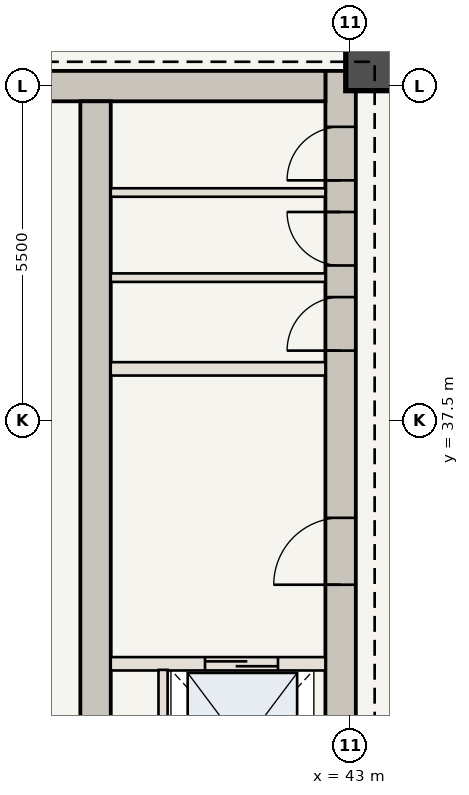
"""IFC4 building model, lengths in metres.
Left out: names, types, materials, properties, quantities, classifications, styles, units other than length and angle.
Written with IfcOpenShell. Run it as: python <this file> out.ifc"""

import sys

from ifc_helpers import new_model, si_unit, direction, frame, frame_2d, origin, origin_2d, place, context, subcontext, project, spatial, rectangle, extrude, element, fill, save


model = new_model("IFC4")
c1 = context("Model", 3, precision=1e-05, world=origin(), true_north=direction((0.0, 1.0)))
c2 = subcontext(c1, "Body", "Model", "MODEL_VIEW")
j1 = project(units=[si_unit("LENGTHUNIT", "METRE"), si_unit("PLANEANGLEUNIT", "RADIAN")], contexts=[c1])
p1 = place(None, origin())
s1 = spatial("IfcSite", under=j1, at=p1, CompositionType="ELEMENT")
p2 = place(p1, origin())
s2 = spatial("IfcBuilding", under=s1, at=p2, CompositionType="ELEMENT")
p3 = place(p2, frame((0.0, 0.0, 248.5)))
s3 = spatial("IfcBuildingStorey", under=s2, at=p3, CompositionType="ELEMENT", Elevation=248.5)
p4 = place(p3, frame((42.84, 30.6, 0.0), z_axis=(0.0, 0.0, 1.0), x_axis=(0.0, 1.0, 0.0)))
e1 = element("IfcWall", 1, at=p4, inside=s3, PredefinedType="SHEAR", context=c2, shape_type="SweptSolid", body=[
    extrude(rectangle(XDim=12.65, YDim=0.5, at=frame_2d((6.325, 0.0))), origin(), (0.0, 0.0, 1.0), 3.85),
])
p5 = place(p4, frame((4.2, 0.0, 0.0)))
e2 = element("IfcOpeningElement", 2, at=p5, cuts=e1, PredefinedType="OPENING", context=c2, shape_type="SweptSolid", body=[
    extrude(rectangle(XDim=1.1, YDim=2.15, at=frame_2d((0.55, 1.075))), frame((0.0, 0.26, 0.0), z_axis=(0.0, -1.0, 0.0), x_axis=(1.0, 0.0, 0.0)), (0.0, 0.0, 1.0), 0.52),
])
p6 = place(p4, frame((8.05, 0.0, 0.0)))
e3 = element("IfcOpeningElement", 3, at=p6, cuts=e1, PredefinedType="OPENING", context=c2, shape_type="SweptSolid", body=[
    extrude(rectangle(XDim=0.88, YDim=2.1, at=frame_2d((0.44, 1.05))), frame((0.0, 0.26, 0.0), z_axis=(0.0, -1.0, 0.0), x_axis=(1.0, 0.0, 0.0)), (0.0, 0.0, 1.0), 0.52),
])
p7 = place(p4, frame((9.45, 0.0, 0.0)))
e4 = element("IfcOpeningElement", 4, at=p7, cuts=e1, PredefinedType="OPENING", context=c2, shape_type="SweptSolid", body=[
    extrude(rectangle(XDim=0.88, YDim=2.1, at=frame_2d((0.44, 1.05))), frame((0.0, 0.26, 0.0), z_axis=(0.0, -1.0, 0.0), x_axis=(1.0, 0.0, 0.0)), (0.0, 0.0, 1.0), 0.52),
])
p8 = place(p4, frame((10.85, 0.0, 0.0)))
e5 = element("IfcOpeningElement", 5, at=p8, cuts=e1, PredefinedType="OPENING", context=c2, shape_type="SweptSolid", body=[
    extrude(rectangle(XDim=0.88, YDim=2.1, at=frame_2d((0.44, 1.05))), frame((0.0, 0.26, 0.0), z_axis=(0.0, -1.0, 0.0), x_axis=(1.0, 0.0, 0.0)), (0.0, 0.0, 1.0), 0.52),
])
p9 = place(p3, frame((37.75, 43.0, 0.0), z_axis=(0.0, 0.0, 1.0), x_axis=(1.0, 0.0, 0.0)))
e6 = element("IfcWall", 6, at=p9, inside=s3, PredefinedType="SHEAR", context=c2, shape_type="SweptSolid", body=[
    extrude(rectangle(XDim=4.84, YDim=0.5, at=frame_2d((2.42, 0.0))), origin(), (0.0, 0.0, 1.0), 3.85),
])
p10 = place(p3, frame((38.81, 30.6, 0.0), z_axis=(0.0, 0.0, 1.0), x_axis=(0.0, 1.0, 0.0)))
e7 = element("IfcWall", 7, at=p10, inside=s3, PredefinedType="SHEAR", context=c2, shape_type="SweptSolid", body=[
    extrude(rectangle(XDim=12.15, YDim=0.5, at=frame_2d((6.075, 0.0))), origin(), (0.0, 0.0, 1.0), 3.85),
])
p11 = place(p3, frame((43.35, 43.35, 0.0), z_axis=(0.0, 0.0, 1.0), x_axis=(1.0, 0.0, 0.0)))
e8 = element("IfcColumn", 8, at=p11, inside=s3, PredefinedType="COLUMN", context=c2, shape_type="SweptSolid", body=[
    extrude(rectangle(XDim=0.85, YDim=0.85, at=origin_2d()), origin(), (0.0, 0.0, 1.0), 3.85),
])
p12 = place(p3, frame((39.06, 33.5, 0.0), z_axis=(0.0, 0.0, 1.0), x_axis=(1.0, 0.0, 0.0)))
e9 = element("IfcWall", 9, at=p12, inside=s3, PredefinedType="STANDARD", context=c2, shape_type="SweptSolid", body=[
    extrude(rectangle(XDim=3.53, YDim=0.22, at=frame_2d((1.765, 0.0))), origin(), (0.0, 0.0, 1.0), 3.43),
])
p13 = place(p12, frame((1.55, 0.0, 0.0)))
e10 = element("IfcOpeningElement", 10, at=p13, cuts=e9, PredefinedType="OPENING", context=c2, shape_type="SweptSolid", body=[
    extrude(rectangle(XDim=1.2, YDim=2.2, at=frame_2d((0.6, 1.1))), frame((0.0, 0.12, 0.0), z_axis=(0.0, -1.0, 0.0), x_axis=(1.0, 0.0, 0.0)), (0.0, 0.0, 1.0), 0.24),
])
p14 = place(p3, frame((39.92, 30.75, 0.0), z_axis=(0.0, 0.0, 1.0), x_axis=(0.0, 1.0, 0.0)))
e11 = element("IfcWall", 11, at=p14, inside=s3, PredefinedType="STANDARD", context=c2, shape_type="SweptSolid", body=[
    extrude(rectangle(XDim=2.65, YDim=0.15, at=frame_2d((1.325, 0.0))), origin(), (0.0, 0.0, 1.0), 3.43),
])
p15 = place(p3, frame((39.06, 38.35, 0.0), z_axis=(0.0, 0.0, 1.0), x_axis=(1.0, 0.0, 0.0)))
e12 = element("IfcWall", 12, at=p15, inside=s3, PredefinedType="STANDARD", context=c2, shape_type="SweptSolid", body=[
    extrude(rectangle(XDim=3.53, YDim=0.22, at=frame_2d((1.765, 0.0))), origin(), (0.0, 0.0, 1.0), 3.43),
])
for number, where, z_axis, x_axis in (
    (13, (39.06, 39.85, 0.0), (0.0, 0.0, 1.0), (1.0, 0.0, 0.0)),
    (14, (39.06, 41.25, 0.0), (0.0, 0.0, 1.0), (1.0, 0.0, 0.0)),
):
    element("IfcWall", number, at=place(p3, frame(where, z_axis=z_axis, x_axis=x_axis)), inside=s3, PredefinedType="STANDARD", context=c2, shape_type="SweptSolid", body=[
        extrude(rectangle(XDim=3.53, YDim=0.14, at=frame_2d((1.765, 0.0))), origin(), (0.0, 0.0, 1.0), 3.43),
    ])
p16 = place(p5, origin())
e15 = element("IfcDoor", 15, at=p16, inside=s3, OperationType="SINGLE_SWING_LEFT", PredefinedType="DOOR", context=c2, shape_type="SweptSolid", body=[
    extrude(rectangle(XDim=1.1, YDim=2.15, at=frame_2d((0.55, 1.075))), frame((0.0, 0.025, 0.0), z_axis=(0.0, -1.0, 0.0), x_axis=(1.0, 0.0, 0.0)), (0.0, 0.0, 1.0), 0.05),
])
fill(e2, e15)
p17 = place(p6, origin())
e16 = element("IfcDoor", 16, at=p17, inside=s3, OperationType="SINGLE_SWING_LEFT", PredefinedType="DOOR", context=c2, shape_type="SweptSolid", body=[
    extrude(rectangle(XDim=0.88, YDim=2.1, at=frame_2d((0.44, 1.05))), frame((0.0, 0.025, 0.0), z_axis=(0.0, -1.0, 0.0), x_axis=(1.0, 0.0, 0.0)), (0.0, 0.0, 1.0), 0.05),
])
fill(e3, e16)
p18 = place(p7, origin())
e17 = element("IfcDoor", 17, at=p18, inside=s3, OperationType="SINGLE_SWING_RIGHT", PredefinedType="DOOR", context=c2, shape_type="SweptSolid", body=[
    extrude(rectangle(XDim=0.88, YDim=2.1, at=frame_2d((0.44, 1.05))), frame((0.0, 0.025, 0.0), z_axis=(0.0, -1.0, 0.0), x_axis=(1.0, 0.0, 0.0)), (0.0, 0.0, 1.0), 0.05),
])
fill(e4, e17)
p19 = place(p8, origin())
e18 = element("IfcDoor", 18, at=p19, inside=s3, OperationType="SINGLE_SWING_LEFT", PredefinedType="DOOR", context=c2, shape_type="SweptSolid", body=[
    extrude(rectangle(XDim=0.88, YDim=2.1, at=frame_2d((0.44, 1.05))), frame((0.0, 0.025, 0.0), z_axis=(0.0, -1.0, 0.0), x_axis=(1.0, 0.0, 0.0)), (0.0, 0.0, 1.0), 0.05),
])
fill(e5, e18)
p20 = place(p13, origin())
e19 = element("IfcDoor", 19, at=p20, inside=s3, OperationType="DOUBLE_DOOR_SLIDING", PredefinedType="DOOR", context=c2, shape_type="SweptSolid", body=[
    extrude(rectangle(XDim=1.2, YDim=2.2, at=frame_2d((0.6, 1.1))), frame((0.0, 0.025, 0.0), z_axis=(0.0, -1.0, 0.0), x_axis=(1.0, 0.0, 0.0)), (0.0, 0.0, 1.0), 0.05),
])
fill(e10, e19)
save(model, sys.argv[1])
